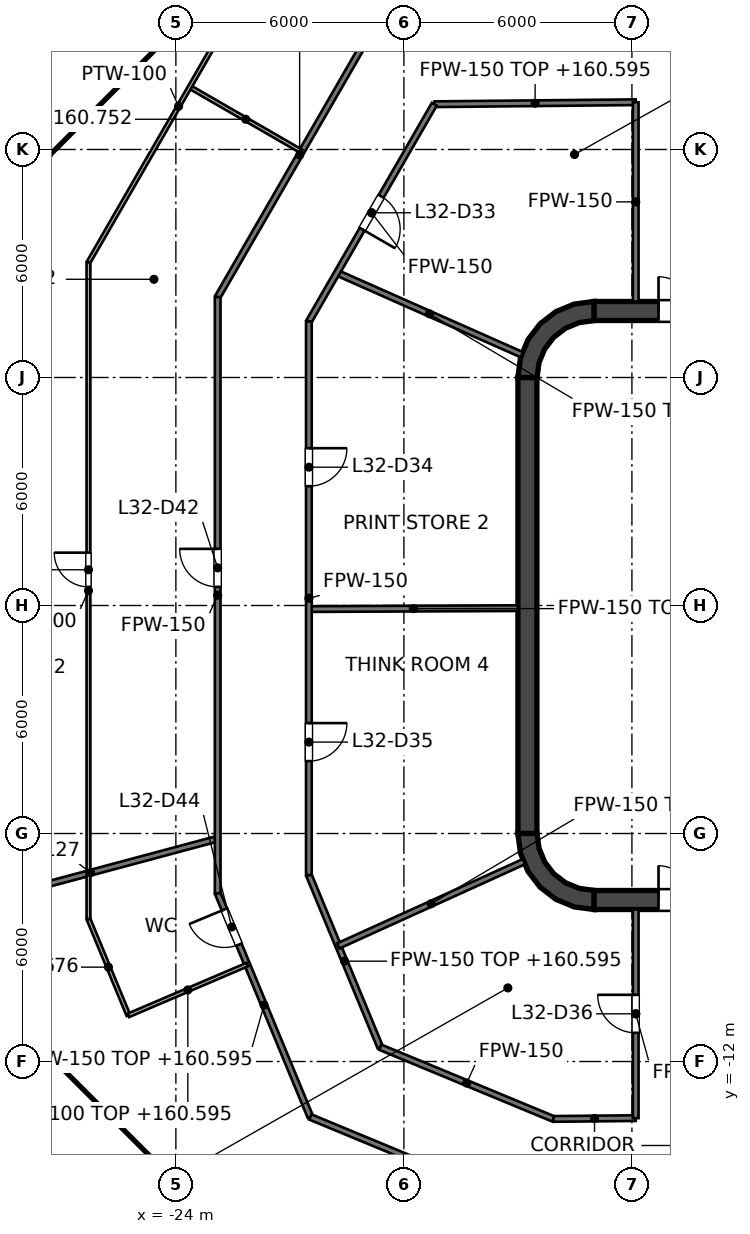
"""IFC4 building model, lengths in metres.
Left out: names, types, materials, properties, quantities, classifications, styles, units other than length and angle.
Written with IfcOpenShell. Run it as: python <this file> out.ifc"""

import sys

from ifc_helpers import new_model, si_unit, direction, frame, frame_2d, origin, place, context, subcontext, project, spatial, polyline, rectangle, outline, extrude, element, fill, save


model = new_model("IFC4")
c1 = context("Model", 3, precision=1e-05, world=origin(), true_north=direction((0.0, 1.0)))
c2 = subcontext(c1, "Body", "Model", "MODEL_VIEW")
j1 = project(units=[si_unit("LENGTHUNIT", "METRE"), si_unit("PLANEANGLEUNIT", "RADIAN")], contexts=[c1])
p1 = place(None, origin())
s1 = spatial("IfcSite", under=j1, at=p1, CompositionType="ELEMENT")
p2 = place(p1, origin())
s2 = spatial("IfcBuilding", under=s1, at=p2, CompositionType="ELEMENT")
p3 = place(p2, frame((0.0, 0.0, 157.6)))
s3 = spatial("IfcBuildingStorey", under=s2, at=p3, CompositionType="ELEMENT", Elevation=157.6)
p4 = place(p3, frame((-13.0, 7.75, 0.0), z_axis=(0.0, 0.0, 1.0), x_axis=(1.0, 0.0, 0.0)))
e1 = element("IfcWall", 1, at=p4, inside=s3, PredefinedType="SHEAR", context=c2, shape_type="SweptSolid", body=[
    extrude(rectangle(XDim=26.0, YDim=0.5, at=frame_2d((13.0, 0.0))), origin(), (0.0, 0.0, 1.0), 4.0),
])
p5 = place(p4, frame((1.7, 0.0, 0.0)))
e2 = element("IfcOpeningElement", 2, at=p5, cuts=e1, PredefinedType="OPENING", context=c2, shape_type="SweptSolid", body=[
    extrude(rectangle(XDim=1.8, YDim=2.1, at=frame_2d((0.9, 1.05))), frame((0.0, 0.25, 0.0), z_axis=(0.0, -1.0, 0.0), x_axis=(1.0, 0.0, 0.0)), (0.0, 0.0, 1.0), 0.5),
])
p6 = place(p4, frame((22.5, 0.0, 0.0)))
e3 = element("IfcOpeningElement", 3, at=p6, cuts=e1, PredefinedType="OPENING", context=c2, shape_type="SweptSolid", body=[
    extrude(rectangle(XDim=1.8, YDim=2.1, at=frame_2d((0.9, 1.05))), frame((0.0, 0.25, 0.0), z_axis=(0.0, -1.0, 0.0), x_axis=(1.0, 0.0, 0.0)), (0.0, 0.0, 1.0), 0.5),
])
p7 = place(p3, frame((-13.0, -7.75, 0.0), z_axis=(0.0, 0.0, 1.0), x_axis=(1.0, 0.0, 0.0)))
e4 = element("IfcWall", 4, at=p7, inside=s3, PredefinedType="SHEAR", context=c2, shape_type="SweptSolid", body=[
    extrude(rectangle(XDim=26.0, YDim=0.5, at=frame_2d((13.0, 0.0))), origin(), (0.0, 0.0, 1.0), 4.0),
])
p8 = place(p7, frame((1.7, 0.0, 0.0)))
e5 = element("IfcOpeningElement", 5, at=p8, cuts=e4, PredefinedType="OPENING", context=c2, shape_type="SweptSolid", body=[
    extrude(rectangle(XDim=1.8, YDim=2.1, at=frame_2d((0.9, 1.05))), frame((0.0, 0.25, 0.0), z_axis=(0.0, -1.0, 0.0), x_axis=(1.0, 0.0, 0.0)), (0.0, 0.0, 1.0), 0.5),
])
p9 = place(p7, frame((22.5, 0.0, 0.0)))
e6 = element("IfcOpeningElement", 6, at=p9, cuts=e4, PredefinedType="OPENING", context=c2, shape_type="SweptSolid", body=[
    extrude(rectangle(XDim=1.8, YDim=2.1, at=frame_2d((0.9, 1.05))), frame((0.0, 0.25, 0.0), z_axis=(0.0, -1.0, 0.0), x_axis=(1.0, 0.0, 0.0)), (0.0, 0.0, 1.0), 0.5),
])
p10 = place(p3, frame((-14.75, -6.0, 0.0), z_axis=(0.0, 0.0, 1.0), x_axis=(0.0, 1.0, 0.0)))
e7 = element("IfcWall", 7, at=p10, inside=s3, PredefinedType="SHEAR", context=c2, shape_type="SweptSolid", body=[
    extrude(rectangle(XDim=12.0, YDim=0.5, at=frame_2d((6.0, 0.0))), origin(), (0.0, 0.0, 1.0), 4.0),
])
p11 = place(p3, origin())
e8 = element("IfcWall", 8, at=p11, inside=s3, PredefinedType="SHEAR", context=c2, shape_type="SweptSolid", body=[
    extrude(outline(polyline([(-15.0, 6.0), (-14.496, 6.0), (-14.445, 6.387), (-14.295, 6.748), (-14.058, 7.058), (-13.748, 7.295), (-13.387, 7.445), (-13.0, 7.496), (-13.0, 8.0), (-13.518, 7.932), (-14.0, 7.732), (-14.414, 7.414), (-14.732, 7.0), (-14.932, 6.518), (-15.0, 6.0)])), origin(), (0.0, 0.0, 1.0), 4.0),
])
e9 = element("IfcWall", 9, at=p11, inside=s3, PredefinedType="SHEAR", context=c2, shape_type="SweptSolid", body=[
    extrude(outline(polyline([(-13.0, -8.0), (-13.0, -7.496), (-13.387, -7.445), (-13.748, -7.295), (-14.058, -7.058), (-14.295, -6.748), (-14.445, -6.387), (-14.496, -6.0), (-15.0, -6.0), (-14.932, -6.518), (-14.732, -7.0), (-14.414, -7.414), (-14.0, -7.732), (-13.518, -7.932), (-13.0, -8.0)])), origin(), (0.0, 0.0, 1.0), 4.0),
])
p12 = place(p3, frame((-11.8, -7.5, 0.0), z_axis=(0.0, 0.0, 1.0), x_axis=(0.0, 1.0, 0.0)))
e10 = element("IfcWall", 10, at=p12, inside=s3, PredefinedType="SOLIDWALL", context=c2, shape_type="SweptSolid", body=[
    extrude(rectangle(XDim=15.0, YDim=0.4, at=frame_2d((7.5, 0.0))), origin(), (0.0, 0.0, 1.0), 3.85),
])
p13 = place(p12, frame((11.3, 0.0, 0.0)))
e11 = element("IfcOpeningElement", 11, at=p13, cuts=e10, PredefinedType="OPENING", context=c2, shape_type="SweptSolid", body=[
    extrude(rectangle(XDim=1.1, YDim=2.1, at=frame_2d((0.55, 1.05))), frame((0.0, 0.2, 0.0), z_axis=(0.0, -1.0, 0.0), x_axis=(1.0, 0.0, 0.0)), (0.0, 0.0, 1.0), 0.4),
])
p14 = place(p12, frame((8.4, 0.0, 0.0)))
e12 = element("IfcOpeningElement", 12, at=p14, cuts=e10, PredefinedType="OPENING", context=c2, shape_type="SweptSolid", body=[
    extrude(rectangle(XDim=1.1, YDim=2.1, at=frame_2d((0.55, 1.05))), frame((0.0, 0.2, 0.0), z_axis=(0.0, -1.0, 0.0), x_axis=(1.0, 0.0, 0.0)), (0.0, 0.0, 1.0), 0.4),
])
p15 = place(p12, frame((5.5, 0.0, 0.0)))
e13 = element("IfcOpeningElement", 13, at=p15, cuts=e10, PredefinedType="OPENING", context=c2, shape_type="SweptSolid", body=[
    extrude(rectangle(XDim=1.1, YDim=2.1, at=frame_2d((0.55, 1.05))), frame((0.0, 0.2, 0.0), z_axis=(0.0, -1.0, 0.0), x_axis=(1.0, 0.0, 0.0)), (0.0, 0.0, 1.0), 0.4),
])
p16 = place(p12, frame((13.697, 0.0, 0.0)))
e14 = element("IfcOpeningElement", 14, at=p16, cuts=e10, PredefinedType="OPENING", context=c2, shape_type="SweptSolid", body=[
    extrude(rectangle(XDim=0.9, YDim=2.1, at=frame_2d((0.45, 1.05))), frame((0.0, 0.2, 0.0), z_axis=(0.0, -1.0, 0.0), x_axis=(1.0, 0.0, 0.0)), (0.0, 0.0, 1.0), 0.4),
])
p17 = place(p12, frame((0.403, 0.0, 0.0)))
e15 = element("IfcOpeningElement", 15, at=p17, cuts=e10, PredefinedType="OPENING", context=c2, shape_type="SweptSolid", body=[
    extrude(rectangle(XDim=0.9, YDim=2.1, at=frame_2d((0.45, 1.05))), frame((0.0, 0.2, 0.0), z_axis=(0.0, -1.0, 0.0), x_axis=(1.0, 0.0, 0.0)), (0.0, 0.0, 1.0), 0.4),
])
e16 = element("IfcWall", 16, at=p11, inside=s3, PredefinedType="SOLIDWALL", context=c2, shape_type="SweptSolid", body=[
    extrude(outline(polyline([(-12.0, -5.925), (-12.0, -5.675), (-14.25, -5.675), (-14.25, -3.025), (-12.0, -3.025), (-12.0, -2.775), (-14.25, -2.775), (-14.25, -0.125), (-12.0, -0.125), (-12.0, 0.125), (-14.25, 0.125), (-14.25, 2.775), (-12.0, 2.775), (-12.0, 3.025), (-14.25, 3.025), (-14.25, 5.675), (-12.0, 5.675), (-12.0, 5.925), (-14.25, 5.925), (-14.5, 5.925), (-14.5, 5.675), (-14.5, 3.025), (-14.5, 2.775), (-14.5, 0.125), (-14.5, -0.125), (-14.5, -2.775), (-14.5, -3.025), (-14.5, -5.675), (-14.5, -5.925), (-14.25, -5.925), (-12.0, -5.925)])), origin(), (0.0, 0.0, 1.0), 3.85),
])
p18 = place(p3, frame((-22.9, -7.572, 0.0), z_axis=(0.0, 0.0, 1.0), x_axis=(0.382860357704, -0.923806227788, 0.0)))
e17 = element("IfcWall", 17, at=p18, inside=s3, PredefinedType="PARTITIONING", context=c2, shape_type="SweptSolid", body=[
    extrude(rectangle(XDim=6.374, YDim=0.15, at=frame_2d((3.187, 0.0))), origin(), (0.0, 0.0, 1.0), 2.995),
])
p19 = place(p18, frame((0.462, 0.0, 0.0)))
e18 = element("IfcOpeningElement", 18, at=p19, cuts=e17, PredefinedType="OPENING", context=c2, shape_type="SweptSolid", body=[
    extrude(rectangle(XDim=1.0, YDim=2.1, at=frame_2d((0.5, 1.05))), frame((0.0, 0.075, 0.0), z_axis=(0.0, -1.0, 0.0), x_axis=(1.0, 0.0, 0.0)), (0.0, 0.0, 1.0), 0.15),
])
p20 = place(p3, frame((-20.5, -7.095, 0.0), z_axis=(0.0, 0.0, 1.0), x_axis=(0.382878184095, -0.923798839653, 0.0)))
e19 = element("IfcWall", 19, at=p20, inside=s3, PredefinedType="PARTITIONING", context=c2, shape_type="SweptSolid", body=[
    extrude(rectangle(XDim=4.902, YDim=0.15, at=frame_2d((2.451, 0.0))), origin(), (0.0, 0.0, 1.0), 2.995),
])
p21 = place(p3, frame((-19.76, 8.755, 0.0), z_axis=(0.0, 0.0, 1.0), x_axis=(0.91424834547, -0.405154245695, 0.0)))
e20 = element("IfcWall", 20, at=p21, inside=s3, PredefinedType="PARTITIONING", context=c2, shape_type="SweptSolid", body=[
    extrude(rectangle(XDim=5.318, YDim=0.15, at=frame_2d((2.659, 0.0))), origin(), (0.0, 0.0, 1.0), 2.995),
])
p22 = place(p3, frame((-20.46, -13.46, 0.0), z_axis=(0.0, 0.0, 1.0), x_axis=(0.923801547606, -0.382871650349, 0.0)))
e21 = element("IfcWall", 21, at=p22, inside=s3, PredefinedType="PARTITIONING", context=c2, shape_type="SweptSolid", body=[
    extrude(rectangle(XDim=6.415, YDim=0.15, at=frame_2d((3.208, 0.0))), origin(), (0.0, 0.0, 1.0), 2.927),
])
p23 = place(p3, frame((-18.623, -11.623, 0.0), z_axis=(0.0, 0.0, 1.0), x_axis=(0.923791670587, -0.38289548098, 0.0)))
e22 = element("IfcWall", 22, at=p23, inside=s3, PredefinedType="PARTITIONING", context=c2, shape_type="SweptSolid", body=[
    extrude(rectangle(XDim=4.931, YDim=0.15, at=frame_2d((2.465, 0.0))), origin(), (0.0, 0.0, 1.0), 2.927),
])
p24 = place(p3, frame((-20.5, -0.094, 0.0), z_axis=(0.0, 0.0, 1.0), x_axis=(0.999990148138, 0.004438876723, 0.0)))
e23 = element("IfcWall", 23, at=p24, inside=s3, PredefinedType="PARTITIONING", context=c2, shape_type="SweptSolid", body=[
    extrude(rectangle(XDim=5.5, YDim=0.15, at=frame_2d((2.75, 0.0))), origin(), (0.0, 0.0, 1.0), 2.995),
])
p25 = place(p3, frame((-14.068, -13.511, 0.0), z_axis=(0.0, 0.0, 1.0), x_axis=(0.999950911515, 0.009908307647, 0.0)))
e24 = element("IfcWall", 24, at=p25, inside=s3, PredefinedType="PARTITIONING", context=c2, shape_type="SweptSolid", body=[
    extrude(rectangle(XDim=2.168, YDim=0.15, at=frame_2d((1.084, 0.0))), origin(), (0.0, 0.0, 1.0), 2.995),
])
p26 = place(p3, frame((-17.194, 13.191, 0.0), z_axis=(0.0, 0.0, 1.0), x_axis=(0.999950853109, 0.009914200296, 0.0)))
e25 = element("IfcWall", 25, at=p26, inside=s3, PredefinedType="PARTITIONING", context=c2, shape_type="SweptSolid", body=[
    extrude(rectangle(XDim=5.294, YDim=0.15, at=frame_2d((2.647, 0.0))), origin(), (0.0, 0.0, 1.0), 2.995),
])
p27 = place(p3, frame((-29.591, -7.929, 0.0), z_axis=(0.0, 0.0, 1.0), x_axis=(0.965923037728, 0.258829451931, 0.0)))
e26 = element("IfcWall", 26, at=p27, inside=s3, PredefinedType="PARTITIONING", context=c2, shape_type="SweptSolid", body=[
    extrude(rectangle(XDim=6.927, YDim=0.15, at=frame_2d((3.464, 0.0))), origin(), (0.0, 0.0, 1.0), 3.527),
])
p28 = place(p3, frame((-19.728, -8.958, 0.0), z_axis=(0.0, 0.0, 1.0), x_axis=(0.910629511797, 0.413223779863, 0.0)))
e27 = element("IfcWall", 27, at=p28, inside=s3, PredefinedType="PARTITIONING", context=c2, shape_type="SweptSolid", body=[
    extrude(rectangle(XDim=5.368, YDim=0.15, at=frame_2d((2.684, 0.0))), origin(), (0.0, 0.0, 1.0), 3.85),
])
p29 = place(p3, frame((-20.5, 7.474, 0.0), z_axis=(0.0, 0.0, 1.0), x_axis=(0.500012665616, 0.866018091164, 0.0)))
e28 = element("IfcWall", 28, at=p29, inside=s3, PredefinedType="PARTITIONING", context=c2, shape_type="SweptSolid", body=[
    extrude(rectangle(XDim=6.602, YDim=0.15, at=frame_2d((3.301, 0.0))), origin(), (0.0, 0.0, 1.0), 2.927),
])
p30 = place(p29, frame((2.803, 0.0, 0.0)))
e29 = element("IfcOpeningElement", 29, at=p30, cuts=e28, PredefinedType="OPENING", context=c2, shape_type="SweptSolid", body=[
    extrude(rectangle(XDim=1.0, YDim=2.1, at=frame_2d((0.5, 1.05))), frame((0.0, 0.075, 0.0), z_axis=(0.0, -1.0, 0.0), x_axis=(1.0, 0.0, 0.0)), (0.0, 0.0, 1.0), 0.15),
])
p31 = place(p3, frame((-22.9, 8.117, 0.0), z_axis=(0.0, 0.0, 1.0), x_axis=(0.5000050195, 0.866022505755, 0.0)))
e30 = element("IfcWall", 30, at=p31, inside=s3, PredefinedType="PARTITIONING", context=c2, shape_type="SweptSolid", body=[
    extrude(rectangle(XDim=8.626, YDim=0.15, at=frame_2d((4.313, 0.0))), origin(), (0.0, 0.0, 1.0), 2.927),
])
p32 = place(p3, frame((-11.9, -13.49, 0.0), z_axis=(0.0, 0.0, 1.0), x_axis=(0.0, 1.0, 0.0)))
e31 = element("IfcWall", 31, at=p32, inside=s3, PredefinedType="PARTITIONING", context=c2, shape_type="SweptSolid", body=[
    extrude(rectangle(XDim=5.49, YDim=0.15, at=frame_2d((2.745, 0.0))), origin(), (0.0, 0.0, 1.0), 2.927),
])
p33 = place(p32, frame((2.245, 0.0, 0.0)))
e32 = element("IfcOpeningElement", 32, at=p33, cuts=e31, PredefinedType="OPENING", context=c2, shape_type="SweptSolid", body=[
    extrude(rectangle(XDim=1.0, YDim=2.1, at=frame_2d((0.5, 1.05))), frame((0.0, 0.075, 0.0), z_axis=(0.0, -1.0, 0.0), x_axis=(1.0, 0.0, 0.0)), (0.0, 0.0, 1.0), 0.15),
])
p34 = place(p3, frame((-11.9, 8.0, 0.0), z_axis=(0.0, 0.0, 1.0), x_axis=(0.0, 1.0, 0.0)))
e33 = element("IfcWall", 33, at=p34, inside=s3, PredefinedType="PARTITIONING", context=c2, shape_type="SweptSolid", body=[
    extrude(rectangle(XDim=5.243, YDim=0.15, at=frame_2d((2.622, 0.0))), origin(), (0.0, 0.0, 1.0), 2.927),
])
p35 = place(p3, frame((-20.5, -7.095, 0.0), z_axis=(0.0, 0.0, 1.0), x_axis=(0.0, 1.0, 0.0)))
e34 = element("IfcWall", 34, at=p35, inside=s3, PredefinedType="PARTITIONING", context=c2, shape_type="SweptSolid", body=[
    extrude(rectangle(XDim=14.569, YDim=0.15, at=frame_2d((7.285, 0.0))), origin(), (0.0, 0.0, 1.0), 2.927),
])
p36 = place(p35, frame((10.234, 0.0, 0.0)))
e35 = element("IfcOpeningElement", 35, at=p36, cuts=e34, PredefinedType="OPENING", context=c2, shape_type="SweptSolid", body=[
    extrude(rectangle(XDim=1.0, YDim=2.1, at=frame_2d((0.5, 1.05))), frame((0.0, 0.075, 0.0), z_axis=(0.0, -1.0, 0.0), x_axis=(1.0, 0.0, 0.0)), (0.0, 0.0, 1.0), 0.15),
])
p37 = place(p35, frame((3.0, 0.0, 0.0)))
e36 = element("IfcOpeningElement", 36, at=p37, cuts=e34, PredefinedType="OPENING", context=c2, shape_type="SweptSolid", body=[
    extrude(rectangle(XDim=1.0, YDim=2.1, at=frame_2d((0.5, 1.05))), frame((0.0, 0.075, 0.0), z_axis=(0.0, -1.0, 0.0), x_axis=(1.0, 0.0, 0.0)), (0.0, 0.0, 1.0), 0.15),
])
p38 = place(p3, frame((-22.9, -7.572, 0.0), z_axis=(0.0, 0.0, 1.0), x_axis=(0.0, 1.0, 0.0)))
e37 = element("IfcWall", 37, at=p38, inside=s3, PredefinedType="PARTITIONING", context=c2, shape_type="SweptSolid", body=[
    extrude(rectangle(XDim=15.689, YDim=0.15, at=frame_2d((7.844, 0.0))), origin(), (0.0, 0.0, 1.0), 2.927),
])
p39 = place(p38, frame((8.062, 0.0, 0.0)))
e38 = element("IfcOpeningElement", 38, at=p39, cuts=e37, PredefinedType="OPENING", context=c2, shape_type="SweptSolid", body=[
    extrude(rectangle(XDim=1.0, YDim=2.1, at=frame_2d((0.5, 1.05))), frame((0.0, 0.075, 0.0), z_axis=(0.0, -1.0, 0.0), x_axis=(1.0, 0.0, 0.0)), (0.0, 0.0, 1.0), 0.15),
])
p40 = place(p3, frame((-26.3, -8.249, 0.0), z_axis=(0.0, 0.0, 1.0), x_axis=(0.382878044957, -0.92379889732, 0.0)))
e39 = element("IfcWall", 39, at=p40, inside=s3, PredefinedType="PARTITIONING", context=c2, shape_type="SweptSolid", body=[
    extrude(rectangle(XDim=2.745, YDim=0.1, at=frame_2d((1.373, 0.0))), origin(), (0.0, 0.0, 1.0), 3.076),
])
p41 = place(p3, frame((-23.634, 13.645, 0.0), z_axis=(0.0, 0.0, 1.0), x_axis=(0.866002606077, -0.500039484709, 0.0)))
e40 = element("IfcWall", 40, at=p41, inside=s3, PredefinedType="PARTITIONING", context=c2, shape_type="SweptSolid", body=[
    extrude(rectangle(XDim=3.4, YDim=0.1, at=frame_2d((1.7, 0.0))), origin(), (0.0, 0.0, 1.0), 3.152),
])
p42 = place(p3, frame((-25.249, -10.785, 0.0), z_axis=(0.0, 0.0, 1.0), x_axis=(0.919590085221, 0.392879211925, 0.0)))
e41 = element("IfcWall", 41, at=p42, inside=s3, PredefinedType="PARTITIONING", context=c2, shape_type="SweptSolid", body=[
    extrude(rectangle(XDim=3.4, YDim=0.1, at=frame_2d((1.7, 0.0))), origin(), (0.0, 0.0, 1.0), 2.995),
])
p43 = place(p3, frame((-26.3, 9.028, 0.0), z_axis=(0.0, 0.0, 1.0), x_axis=(0.499994996542, 0.866028292513, 0.0)))
e42 = element("IfcWall", 42, at=p43, inside=s3, PredefinedType="PARTITIONING", context=c2, shape_type="SweptSolid", body=[
    extrude(rectangle(XDim=9.486, YDim=0.1, at=frame_2d((4.743, 0.0))), origin(), (0.0, 0.0, 1.0), 2.927),
])
p44 = place(p3, frame((-26.3, -8.249, 0.0), z_axis=(0.0, 0.0, 1.0), x_axis=(0.0, 1.0, 0.0)))
e43 = element("IfcWall", 43, at=p44, inside=s3, PredefinedType="PARTITIONING", context=c2, shape_type="SweptSolid", body=[
    extrude(rectangle(XDim=17.277, YDim=0.1, at=frame_2d((8.639, 0.0))), origin(), (0.0, 0.0, 1.0), 2.927),
])
p45 = place(p44, frame((8.739, 0.0, 0.0)))
e44 = element("IfcOpeningElement", 44, at=p45, cuts=e43, PredefinedType="OPENING", context=c2, shape_type="SweptSolid", body=[
    extrude(rectangle(XDim=0.9, YDim=2.1, at=frame_2d((0.45, 1.05))), frame((0.0, 0.05, 0.0), z_axis=(0.0, -1.0, 0.0), x_axis=(1.0, 0.0, 0.0)), (0.0, 0.0, 1.0), 0.1),
])
p46 = place(p13, origin())
e45 = element("IfcDoor", 45, at=p46, inside=s3, OperationType="DOUBLE_DOOR_SLIDING", PredefinedType="DOOR", context=c2, shape_type="SweptSolid", body=[
    extrude(rectangle(XDim=1.1, YDim=2.1, at=frame_2d((0.55, 1.05))), frame((0.0, 0.025, 0.0), z_axis=(0.0, -1.0, 0.0), x_axis=(1.0, 0.0, 0.0)), (0.0, 0.0, 1.0), 0.05),
])
fill(e11, e45)
p47 = place(p14, origin())
e46 = element("IfcDoor", 46, at=p47, inside=s3, OperationType="DOUBLE_DOOR_SLIDING", PredefinedType="DOOR", context=c2, shape_type="SweptSolid", body=[
    extrude(rectangle(XDim=1.1, YDim=2.1, at=frame_2d((0.55, 1.05))), frame((0.0, 0.025, 0.0), z_axis=(0.0, -1.0, 0.0), x_axis=(1.0, 0.0, 0.0)), (0.0, 0.0, 1.0), 0.05),
])
fill(e12, e46)
p48 = place(p15, origin())
e47 = element("IfcDoor", 47, at=p48, inside=s3, OperationType="DOUBLE_DOOR_SLIDING", PredefinedType="DOOR", context=c2, shape_type="SweptSolid", body=[
    extrude(rectangle(XDim=1.1, YDim=2.1, at=frame_2d((0.55, 1.05))), frame((0.0, 0.025, 0.0), z_axis=(0.0, -1.0, 0.0), x_axis=(1.0, 0.0, 0.0)), (0.0, 0.0, 1.0), 0.05),
])
fill(e13, e47)
p49 = place(p16, origin())
e48 = element("IfcDoor", 48, at=p49, inside=s3, OperationType="SINGLE_SWING_LEFT", PredefinedType="DOOR", context=c2, shape_type="SweptSolid", body=[
    extrude(rectangle(XDim=0.9, YDim=2.1, at=frame_2d((0.45, 1.05))), frame((0.0, 0.025, 0.0), z_axis=(0.0, -1.0, 0.0), x_axis=(1.0, 0.0, 0.0)), (0.0, 0.0, 1.0), 0.05),
])
fill(e14, e48)
p50 = place(p17, origin())
e49 = element("IfcDoor", 49, at=p50, inside=s3, OperationType="SINGLE_SWING_LEFT", PredefinedType="DOOR", context=c2, shape_type="SweptSolid", body=[
    extrude(rectangle(XDim=0.9, YDim=2.1, at=frame_2d((0.45, 1.05))), frame((0.0, 0.025, 0.0), z_axis=(0.0, -1.0, 0.0), x_axis=(1.0, 0.0, 0.0)), (0.0, 0.0, 1.0), 0.05),
])
fill(e15, e49)
p51 = place(p5, origin())
e50 = element("IfcDoor", 50, at=p51, inside=s3, OperationType="DOUBLE_DOOR_SINGLE_SWING", PredefinedType="DOOR", context=c2, shape_type="SweptSolid", body=[
    extrude(rectangle(XDim=1.8, YDim=2.1, at=frame_2d((0.9, 1.05))), frame((0.0, 0.025, 0.0), z_axis=(0.0, -1.0, 0.0), x_axis=(1.0, 0.0, 0.0)), (0.0, 0.0, 1.0), 0.05),
])
fill(e2, e50)
p52 = place(p8, origin())
e51 = element("IfcDoor", 51, at=p52, inside=s3, OperationType="DOUBLE_DOOR_SINGLE_SWING", PredefinedType="DOOR", context=c2, shape_type="SweptSolid", body=[
    extrude(rectangle(XDim=1.8, YDim=2.1, at=frame_2d((0.9, 1.05))), frame((0.0, 0.025, 0.0), z_axis=(0.0, -1.0, 0.0), x_axis=(1.0, 0.0, 0.0)), (0.0, 0.0, 1.0), 0.05),
])
fill(e5, e51)
p53 = place(p30, origin())
e52 = element("IfcDoor", 52, at=p53, inside=s3, OperationType="SINGLE_SWING_LEFT", PredefinedType="DOOR", context=c2, shape_type="SweptSolid", body=[
    extrude(rectangle(XDim=1.0, YDim=2.1, at=frame_2d((0.5, 1.05))), frame((0.0, 0.025, 0.0), z_axis=(0.0, -1.0, 0.0), x_axis=(1.0, 0.0, 0.0)), (0.0, 0.0, 1.0), 0.05),
])
fill(e29, e52)
p54 = place(p36, origin())
e53 = element("IfcDoor", 53, at=p54, inside=s3, OperationType="SINGLE_SWING_RIGHT", PredefinedType="DOOR", context=c2, shape_type="SweptSolid", body=[
    extrude(rectangle(XDim=1.0, YDim=2.1, at=frame_2d((0.5, 1.05))), frame((0.0, 0.025, 0.0), z_axis=(0.0, -1.0, 0.0), x_axis=(1.0, 0.0, 0.0)), (0.0, 0.0, 1.0), 0.05),
])
fill(e35, e53)
p55 = place(p37, origin())
e54 = element("IfcDoor", 54, at=p55, inside=s3, OperationType="SINGLE_SWING_RIGHT", PredefinedType="DOOR", context=c2, shape_type="SweptSolid", body=[
    extrude(rectangle(XDim=1.0, YDim=2.1, at=frame_2d((0.5, 1.05))), frame((0.0, 0.025, 0.0), z_axis=(0.0, -1.0, 0.0), x_axis=(1.0, 0.0, 0.0)), (0.0, 0.0, 1.0), 0.05),
])
fill(e36, e54)
p56 = place(p33, origin())
e55 = element("IfcDoor", 55, at=p56, inside=s3, OperationType="SINGLE_SWING_RIGHT", PredefinedType="DOOR", context=c2, shape_type="SweptSolid", body=[
    extrude(rectangle(XDim=1.0, YDim=2.1, at=frame_2d((0.5, 1.05))), frame((0.0, 0.025, 0.0), z_axis=(0.0, -1.0, 0.0), x_axis=(1.0, 0.0, 0.0)), (0.0, 0.0, 1.0), 0.05),
])
fill(e32, e55)
p57 = place(p39, origin())
e56 = element("IfcDoor", 56, at=p57, inside=s3, OperationType="SINGLE_SWING_RIGHT", PredefinedType="DOOR", context=c2, shape_type="SweptSolid", body=[
    extrude(rectangle(XDim=1.0, YDim=2.1, at=frame_2d((0.5, 1.05))), frame((0.0, 0.025, 0.0), z_axis=(0.0, -1.0, 0.0), x_axis=(1.0, 0.0, 0.0)), (0.0, 0.0, 1.0), 0.05),
])
fill(e38, e56)
p58 = place(p45, origin())
e57 = element("IfcDoor", 57, at=p58, inside=s3, OperationType="SINGLE_SWING_RIGHT", PredefinedType="DOOR", context=c2, shape_type="SweptSolid", body=[
    extrude(rectangle(XDim=0.9, YDim=2.1, at=frame_2d((0.45, 1.05))), frame((0.0, 0.025, 0.0), z_axis=(0.0, -1.0, 0.0), x_axis=(1.0, 0.0, 0.0)), (0.0, 0.0, 1.0), 0.05),
])
fill(e44, e57)
p59 = place(p19, origin())
e58 = element("IfcDoor", 58, at=p59, inside=s3, OperationType="SINGLE_SWING_LEFT", PredefinedType="DOOR", context=c2, shape_type="SweptSolid", body=[
    extrude(rectangle(XDim=1.0, YDim=2.1, at=frame_2d((0.5, 1.05))), frame((0.0, 0.025, 0.0), z_axis=(0.0, -1.0, 0.0), x_axis=(1.0, 0.0, 0.0)), (0.0, 0.0, 1.0), 0.05),
])
fill(e18, e58)
save(model, sys.argv[1])
